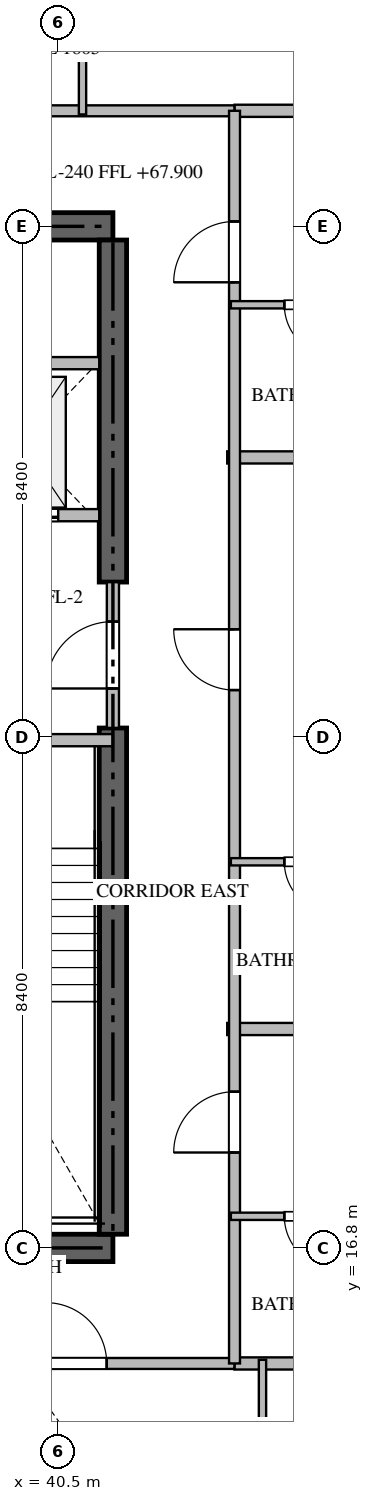
"""IFC4 building model, lengths in metres.
Left out: names, types, materials, properties, quantities, classifications, styles, units other than length and angle.
Written with IfcOpenShell. Run it as: python <this file> out.ifc"""

import sys

from ifc_helpers import new_model, si_unit, direction, frame, frame_2d, origin, place, context, subcontext, project, spatial, rectangle, extrude, source, transform, mapped, element, fill, save


model = new_model("IFC4")
c1 = context("Model", 3, precision=1e-05, world=origin(), true_north=direction((0.0, 1.0)))
c2 = subcontext(c1, "Body", "Model", "MODEL_VIEW")
j1 = project(units=[si_unit("LENGTHUNIT", "METRE"), si_unit("PLANEANGLEUNIT", "RADIAN")], contexts=[c1])
p1 = place(None, origin())
s1 = spatial("IfcSite", under=j1, at=p1, CompositionType="ELEMENT")
p2 = place(p1, origin())
s2 = spatial("IfcBuilding", under=s1, at=p2, CompositionType="ELEMENT")
p3 = place(p2, frame((0.0, 0.0, 67.95)))
s3 = spatial("IfcBuildingStorey", under=s2, at=p3, CompositionType="ELEMENT", Elevation=67.95)
for number, where, z_axis, x_axis in (
    (1, (23.4, 16.8, -0.26), (0.0, 0.0, 1.0), (1.0, 0.0, 0.0)),
    (2, (41.4, 33.6, -0.26), (0.0, 0.0, 1.0), (-1.0, 0.0, 0.0)),
):
    element("IfcWall", number, at=place(p3, frame(where, z_axis=z_axis, x_axis=x_axis)), inside=s3, PredefinedType="SHEAR", context=c2, shape_type="SweptSolid", body=[
        extrude(rectangle(XDim=18.0, YDim=0.45, at=frame_2d((9.0, 0.0))), origin(), (0.0, 0.0, 1.0), 3.748),
    ])
p4 = place(p3, frame((41.4, 17.025, -0.26), z_axis=(0.0, 0.0, 1.0), x_axis=(0.0, 1.0, 0.0)))
e3 = element("IfcWall", 3, at=p4, inside=s3, PredefinedType="SHEAR", context=c2, shape_type="SweptSolid", body=[
    extrude(rectangle(XDim=8.325, YDim=0.45, at=frame_2d((4.163, 0.0))), origin(), (0.0, 0.0, 1.0), 3.748),
])
p5 = place(p3, frame((41.4, 27.75, -0.26), z_axis=(0.0, 0.0, 1.0), x_axis=(0.0, 1.0, 0.0)))
e4 = element("IfcWall", 4, at=p5, inside=s3, PredefinedType="SHEAR", context=c2, shape_type="SweptSolid", body=[
    extrude(rectangle(XDim=5.625, YDim=0.45, at=frame_2d((2.812, 0.0))), origin(), (0.0, 0.0, 1.0), 3.748),
])
p6 = place(p3, frame((36.95, 25.15, 0.0), z_axis=(0.0, 0.0, 1.0), x_axis=(1.0, 0.0, 0.0)))
e5 = element("IfcWall", 5, at=p6, inside=s3, PredefinedType="STANDARD", context=c2, shape_type="SweptSolid", body=[
    extrude(rectangle(XDim=4.45, YDim=0.2, at=frame_2d((2.225, 0.0))), origin(), (0.0, 0.0, 1.0), 3.49),
])
p7 = place(p6, frame((1.65, 0.0, 0.0)))
e6 = element("IfcOpeningElement", 6, at=p7, cuts=e5, PredefinedType="OPENING", context=c2, shape_type="SweptSolid", body=[
    extrude(rectangle(XDim=1.1, YDim=2.15, at=frame_2d((0.55, 1.075))), frame((0.0, 0.11, 0.0), z_axis=(0.0, -1.0, 0.0), x_axis=(1.0, 0.0, 0.0)), (0.0, 0.0, 1.0), 0.22),
])
p8 = place(p3, frame((38.75, 28.85, 0.0), z_axis=(0.0, 0.0, 1.0), x_axis=(1.0, 0.0, 0.0)))
e7 = element("IfcWall", 7, at=p8, inside=s3, PredefinedType="STANDARD", context=c2, shape_type="SweptSolid", body=[
    extrude(rectangle(XDim=2.425, YDim=0.2, at=frame_2d((1.212, 0.0))), origin(), (0.0, 0.0, 1.0), 3.49),
])
p9 = place(p8, frame((0.55, 0.0, 0.0)))
e8 = element("IfcOpeningElement", 8, at=p9, cuts=e7, PredefinedType="OPENING", context=c2, shape_type="SweptSolid", body=[
    extrude(rectangle(XDim=1.2, YDim=2.2, at=frame_2d((0.6, 1.1))), frame((0.0, 0.11, 0.0), z_axis=(0.0, -1.0, 0.0), x_axis=(1.0, 0.0, 0.0)), (0.0, 0.0, 1.0), 0.22),
])
p10 = place(p3, frame((38.75, 31.35, 0.0), z_axis=(0.0, 0.0, 1.0), x_axis=(1.0, 0.0, 0.0)))
e9 = element("IfcWall", 9, at=p10, inside=s3, PredefinedType="STANDARD", context=c2, shape_type="SweptSolid", body=[
    extrude(rectangle(XDim=2.425, YDim=0.2, at=frame_2d((1.212, 0.0))), origin(), (0.0, 0.0, 1.0), 3.49),
])
p11 = place(p3, frame((41.4, 25.352, 0.0), z_axis=(0.0, 0.0, 1.0), x_axis=(0.0, 1.0, 0.0)))
e10 = element("IfcWall", 10, at=p11, inside=s3, PredefinedType="STANDARD", context=c2, shape_type="SweptSolid", body=[
    extrude(rectangle(XDim=2.396, YDim=0.2, at=frame_2d((1.198, 0.0))), origin(), (0.0, 0.0, 1.0), 3.49),
])
p12 = place(p11, frame((0.648, 0.0, 0.0)))
e11 = element("IfcOpeningElement", 11, at=p12, cuts=e10, PredefinedType="OPENING", context=c2, shape_type="SweptSolid", body=[
    extrude(rectangle(XDim=1.1, YDim=2.15, at=frame_2d((0.55, 1.075))), frame((0.0, 0.11, 0.0), z_axis=(0.0, -1.0, 0.0), x_axis=(1.0, 0.0, 0.0)), (0.0, 0.0, 1.0), 0.22),
])
for number, where, z_axis, x_axis in (
    (12, (43.28, 20.4, 0.0), (0.0, 0.0, 1.0), (1.0, 0.0, 0.0)),
    (13, (43.28, 29.8, 0.0), (0.0, 0.0, 1.0), (1.0, 0.0, 0.0)),
):
    element("IfcWall", number, at=place(p3, frame(where, z_axis=z_axis, x_axis=x_axis)), inside=s3, PredefinedType="PARTITIONING", context=c2, shape_type="SweptSolid", body=[
        extrude(rectangle(XDim=15.438, YDim=0.2, at=frame_2d((7.719, 0.0))), origin(), (0.0, 0.0, 1.0), 3.49),
    ])
for number, where, z_axis, x_axis in (
    (14, (43.4, 14.9, 0.0), (0.0, 0.0, 1.0), (1.0, 0.0, 0.0)),
    (15, (43.4, 35.5, 0.0), (0.0, 0.0, 1.0), (1.0, 0.0, 0.0)),
):
    element("IfcWall", number, at=place(p3, frame(where, z_axis=z_axis, x_axis=x_axis)), inside=s3, PredefinedType="PARTITIONING", context=c2, shape_type="SweptSolid", body=[
        extrude(rectangle(XDim=15.318, YDim=0.2, at=frame_2d((7.659, 0.0))), origin(), (0.0, 0.0, 1.0), 3.49),
    ])
p13 = place(p3, frame((21.402, 14.9, 0.0), z_axis=(0.0, 0.0, 1.0), x_axis=(1.0, 0.0, 0.0)))
e16 = element("IfcWall", 16, at=p13, inside=s3, PredefinedType="PARTITIONING", context=c2, shape_type="SweptSolid", body=[
    extrude(rectangle(XDim=21.996, YDim=0.18, at=frame_2d((10.998, 0.0))), origin(), (0.0, 0.0, 1.0), 3.49),
])
p14 = place(p13, frame((1.96, 0.0, 0.0)))
e17 = element("IfcOpeningElement", 17, at=p14, cuts=e16, PredefinedType="OPENING", context=c2, shape_type="SweptSolid", body=[
    extrude(rectangle(XDim=1.0, YDim=2.15, at=frame_2d((0.5, 1.075))), frame((0.0, 0.1, 0.0), z_axis=(0.0, -1.0, 0.0), x_axis=(1.0, 0.0, 0.0)), (0.0, 0.0, 1.0), 0.2),
])
p15 = place(p13, frame((5.249, 0.0, 0.0)))
e18 = element("IfcOpeningElement", 18, at=p15, cuts=e16, PredefinedType="OPENING", context=c2, shape_type="SweptSolid", body=[
    extrude(rectangle(XDim=1.0, YDim=2.15, at=frame_2d((0.5, 1.075))), frame((0.0, 0.1, 0.0), z_axis=(0.0, -1.0, 0.0), x_axis=(1.0, 0.0, 0.0)), (0.0, 0.0, 1.0), 0.2),
])
p16 = place(p13, frame((11.653, 0.0, 0.0)))
e19 = element("IfcOpeningElement", 19, at=p16, cuts=e16, PredefinedType="OPENING", context=c2, shape_type="SweptSolid", body=[
    extrude(rectangle(XDim=1.0, YDim=2.15, at=frame_2d((0.5, 1.075))), frame((0.0, 0.1, 0.0), z_axis=(0.0, -1.0, 0.0), x_axis=(1.0, 0.0, 0.0)), (0.0, 0.0, 1.0), 0.2),
])
p17 = place(p13, frame((18.896, 0.0, 0.0)))
e20 = element("IfcOpeningElement", 20, at=p17, cuts=e16, PredefinedType="OPENING", context=c2, shape_type="SweptSolid", body=[
    extrude(rectangle(XDim=1.0, YDim=2.15, at=frame_2d((0.5, 1.075))), frame((0.0, 0.1, 0.0), z_axis=(0.0, -1.0, 0.0), x_axis=(1.0, 0.0, 0.0)), (0.0, 0.0, 1.0), 0.2),
])
p18 = place(p3, frame((21.402, 35.5, 0.0), z_axis=(0.0, 0.0, 1.0), x_axis=(1.0, 0.0, 0.0)))
e21 = element("IfcWall", 21, at=p18, inside=s3, PredefinedType="PARTITIONING", context=c2, shape_type="SweptSolid", body=[
    extrude(rectangle(XDim=21.996, YDim=0.18, at=frame_2d((10.998, 0.0))), origin(), (0.0, 0.0, 1.0), 3.49),
])
p19 = place(p18, frame((7.202, 0.0, 0.0)))
e22 = element("IfcOpeningElement", 22, at=p19, cuts=e21, PredefinedType="OPENING", context=c2, shape_type="SweptSolid", body=[
    extrude(rectangle(XDim=1.0, YDim=2.15, at=frame_2d((0.5, 1.075))), frame((0.0, 0.1, 0.0), z_axis=(0.0, -1.0, 0.0), x_axis=(1.0, 0.0, 0.0)), (0.0, 0.0, 1.0), 0.2),
])
p20 = place(p3, frame((43.4, 14.9, 0.0), z_axis=(0.0, 0.0, 1.0), x_axis=(0.0, 1.0, 0.0)))
e23 = element("IfcWall", 23, at=p20, inside=s3, PredefinedType="PARTITIONING", context=c2, shape_type="SweptSolid", body=[
    extrude(rectangle(XDim=20.6, YDim=0.18, at=frame_2d((10.3, 0.0))), origin(), (0.0, 0.0, 1.0), 3.49),
])
p21 = place(p20, frame((3.469, 0.0, 0.0)))
e24 = element("IfcOpeningElement", 24, at=p21, cuts=e23, PredefinedType="OPENING", context=c2, shape_type="SweptSolid", body=[
    extrude(rectangle(XDim=1.0, YDim=2.15, at=frame_2d((0.5, 1.075))), frame((0.0, 0.1, 0.0), z_axis=(0.0, -1.0, 0.0), x_axis=(1.0, 0.0, 0.0)), (0.0, 0.0, 1.0), 0.2),
])
p22 = place(p20, frame((11.074, 0.0, 0.0)))
e25 = element("IfcOpeningElement", 25, at=p22, cuts=e23, PredefinedType="OPENING", context=c2, shape_type="SweptSolid", body=[
    extrude(rectangle(XDim=1.0, YDim=2.15, at=frame_2d((0.5, 1.075))), frame((0.0, 0.1, 0.0), z_axis=(0.0, -1.0, 0.0), x_axis=(1.0, 0.0, 0.0)), (0.0, 0.0, 1.0), 0.2),
])
p23 = place(p20, frame((17.78, 0.0, 0.0)))
e26 = element("IfcOpeningElement", 26, at=p23, cuts=e23, PredefinedType="OPENING", context=c2, shape_type="SweptSolid", body=[
    extrude(rectangle(XDim=1.0, YDim=2.15, at=frame_2d((0.5, 1.075))), frame((0.0, 0.1, 0.0), z_axis=(0.0, -1.0, 0.0), x_axis=(1.0, 0.0, 0.0)), (0.0, 0.0, 1.0), 0.2),
])
p24 = place(p3, frame((43.86, 12.15, 0.0), z_axis=(0.0, 0.0, 1.0), x_axis=(0.0, 1.0, 0.0)))
e27 = element("IfcWall", 27, at=p24, inside=s3, PredefinedType="PARTITIONING", context=c2, shape_type="SweptSolid", body=[
    extrude(rectangle(XDim=2.81, YDim=0.12, at=frame_2d((1.405, 0.0))), origin(), (0.0, 0.0, 1.0), 3.49),
])
p25 = place(p3, frame((40.9, 37.648, 0.0), z_axis=(0.0, 0.0, 1.0), x_axis=(0.0, -1.0, 0.0)))
e28 = element("IfcWall", 28, at=p25, inside=s3, PredefinedType="PARTITIONING", context=c2, shape_type="SweptSolid", body=[
    extrude(rectangle(XDim=2.208, YDim=0.12, at=frame_2d((1.104, 0.0))), origin(), (0.0, 0.0, 1.0), 3.49),
])
p26 = place(p3, frame((45.948, 17.32, 0.0), z_axis=(0.0, 0.0, 1.0), x_axis=(-1.0, 0.0, 0.0)))
e29 = element("IfcWall", 29, at=p26, inside=s3, PredefinedType="PARTITIONING", context=c2, shape_type="SweptSolid", body=[
    extrude(rectangle(XDim=2.608, YDim=0.12, at=frame_2d((1.304, 0.0))), origin(), (0.0, 0.0, 1.0), 3.49),
])
p27 = place(p26, frame((0.879, 0.0, 0.0)))
e30 = element("IfcOpeningElement", 30, at=p27, cuts=e29, PredefinedType="OPENING", context=c2, shape_type="SweptSolid", body=[
    extrude(rectangle(XDim=0.85, YDim=2.1, at=frame_2d((0.425, 1.05))), frame((0.0, 0.07, 0.0), z_axis=(0.0, -1.0, 0.0), x_axis=(1.0, 0.0, 0.0)), (0.0, 0.0, 1.0), 0.14),
])
p28 = place(p3, frame((45.948, 23.15, 0.0), z_axis=(0.0, 0.0, 1.0), x_axis=(-1.0, 0.0, 0.0)))
e31 = element("IfcWall", 31, at=p28, inside=s3, PredefinedType="PARTITIONING", context=c2, shape_type="SweptSolid", body=[
    extrude(rectangle(XDim=2.608, YDim=0.12, at=frame_2d((1.304, 0.0))), origin(), (0.0, 0.0, 1.0), 3.49),
])
p29 = place(p28, frame((0.879, 0.0, 0.0)))
e32 = element("IfcOpeningElement", 32, at=p29, cuts=e31, PredefinedType="OPENING", context=c2, shape_type="SweptSolid", body=[
    extrude(rectangle(XDim=0.85, YDim=2.1, at=frame_2d((0.425, 1.05))), frame((0.0, 0.07, 0.0), z_axis=(0.0, -1.0, 0.0), x_axis=(1.0, 0.0, 0.0)), (0.0, 0.0, 1.0), 0.14),
])
p30 = place(p3, frame((45.948, 32.31, 0.0), z_axis=(0.0, 0.0, 1.0), x_axis=(-1.0, 0.0, 0.0)))
e33 = element("IfcWall", 33, at=p30, inside=s3, PredefinedType="PARTITIONING", context=c2, shape_type="SweptSolid", body=[
    extrude(rectangle(XDim=2.608, YDim=0.12, at=frame_2d((1.304, 0.0))), origin(), (0.0, 0.0, 1.0), 3.49),
])
p31 = place(p30, frame((0.879, 0.0, 0.0)))
e34 = element("IfcOpeningElement", 34, at=p31, cuts=e33, PredefinedType="OPENING", context=c2, shape_type="SweptSolid", body=[
    extrude(rectangle(XDim=0.85, YDim=2.1, at=frame_2d((0.425, 1.05))), frame((0.0, 0.07, 0.0), z_axis=(0.0, -1.0, 0.0), x_axis=(1.0, 0.0, 0.0)), (0.0, 0.0, 1.0), 0.14),
])
m1 = source(origin(), c2, "Body", "SweptSolid", [
    extrude(rectangle(XDim=1.2, YDim=2.2, at=frame_2d((0.6, 1.1))), frame((0.0, 0.025, 0.0), z_axis=(0.0, -1.0, 0.0), x_axis=(1.0, 0.0, 0.0)), (0.0, 0.0, 1.0), 0.05),
])
p32 = place(p9, origin())
e35 = element("IfcDoor", 35, at=p32, inside=s3, OperationType="DOUBLE_DOOR_SLIDING", PredefinedType="DOOR", context=c2, shape_type="MappedRepresentation", body=[
    mapped(m1, transform((0.0, 0.0, 0.0), scale=1.0)),
])
fill(e8, e35)
m2 = source(origin(), c2, "Body", "SweptSolid", [
    extrude(rectangle(XDim=1.1, YDim=2.15, at=frame_2d((0.55, 1.075))), frame((0.0, 0.025, 0.0), z_axis=(0.0, -1.0, 0.0), x_axis=(1.0, 0.0, 0.0)), (0.0, 0.0, 1.0), 0.05),
])
p33 = place(p12, origin())
e36 = element("IfcDoor", 36, at=p33, inside=s3, OperationType="SINGLE_SWING_LEFT", PredefinedType="DOOR", context=c2, shape_type="MappedRepresentation", body=[
    mapped(m2, transform((0.0, 0.0, 0.0), scale=1.0)),
])
fill(e11, e36)
m3 = source(origin(), c2, "Body", "SweptSolid", [
    extrude(rectangle(XDim=1.0, YDim=2.15, at=frame_2d((0.5, 1.075))), frame((0.0, 0.025, 0.0), z_axis=(0.0, -1.0, 0.0), x_axis=(1.0, 0.0, 0.0)), (0.0, 0.0, 1.0), 0.05),
])
p34 = place(p17, origin())
e37 = element("IfcDoor", 37, at=p34, inside=s3, OperationType="SINGLE_SWING_LEFT", PredefinedType="DOOR", context=c2, shape_type="MappedRepresentation", body=[
    mapped(m3, transform((0.0, 0.0, 0.0), scale=1.0)),
])
fill(e20, e37)
p35 = place(p21, origin())
e38 = element("IfcDoor", 38, at=p35, inside=s3, OperationType="SINGLE_SWING_LEFT", PredefinedType="DOOR", context=c2, shape_type="MappedRepresentation", body=[
    mapped(m3, transform((0.0, 0.0, 0.0), scale=1.0)),
])
fill(e24, e38)
p36 = place(p22, origin())
e39 = element("IfcDoor", 39, at=p36, inside=s3, OperationType="SINGLE_SWING_RIGHT", PredefinedType="DOOR", context=c2, shape_type="MappedRepresentation", body=[
    mapped(m3, transform((0.0, 0.0, 0.0), scale=1.0)),
])
fill(e25, e39)
p37 = place(p23, origin())
e40 = element("IfcDoor", 40, at=p37, inside=s3, OperationType="SINGLE_SWING_LEFT", PredefinedType="DOOR", context=c2, shape_type="MappedRepresentation", body=[
    mapped(m3, transform((0.0, 0.0, 0.0), scale=1.0)),
])
fill(e26, e40)
m4 = source(origin(), c2, "Body", "SweptSolid", [
    extrude(rectangle(XDim=0.85, YDim=2.1, at=frame_2d((0.425, 1.05))), frame((0.0, 0.025, 0.0), z_axis=(0.0, -1.0, 0.0), x_axis=(1.0, 0.0, 0.0)), (0.0, 0.0, 1.0), 0.05),
])
p38 = place(p27, origin())
e41 = element("IfcDoor", 41, at=p38, inside=s3, OperationType="SINGLE_SWING_LEFT", PredefinedType="DOOR", context=c2, shape_type="MappedRepresentation", body=[
    mapped(m4, transform((0.0, 0.0, 0.0), scale=1.0)),
])
fill(e30, e41)
p39 = place(p29, origin())
e42 = element("IfcDoor", 42, at=p39, inside=s3, OperationType="SINGLE_SWING_LEFT", PredefinedType="DOOR", context=c2, shape_type="MappedRepresentation", body=[
    mapped(m4, transform((0.0, 0.0, 0.0), scale=1.0)),
])
fill(e32, e42)
p40 = place(p31, origin())
e43 = element("IfcDoor", 43, at=p40, inside=s3, OperationType="SINGLE_SWING_LEFT", PredefinedType="DOOR", context=c2, shape_type="MappedRepresentation", body=[
    mapped(m4, transform((0.0, 0.0, 0.0), scale=1.0)),
])
fill(e34, e43)
save(model, sys.argv[1])
